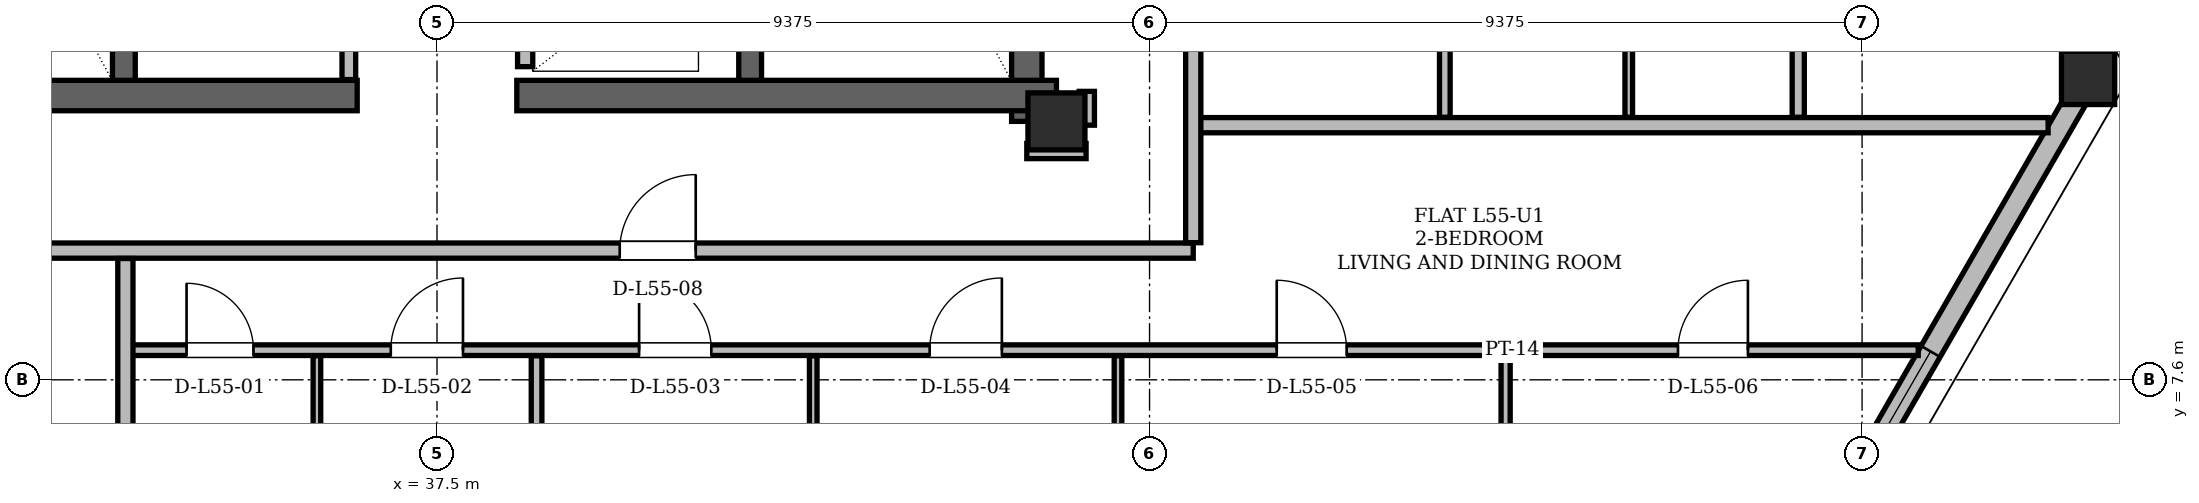
"""IFC4 building model, lengths in metres.
Left out: names, types, materials, properties, quantities, classifications, styles, units other than length and angle.
Written with IfcOpenShell. Run it as: python <this file> out.ifc"""

import sys

from ifc_helpers import new_model, si_unit, direction, frame, frame_2d, origin, origin_2d, place, context, subcontext, project, spatial, rectangle, hollow_rectangle, extrude, element, fill, save


model = new_model("IFC4")
c1 = context("Model", 3, precision=1e-05, world=origin(), true_north=direction((0.0, 1.0)))
c2 = subcontext(c1, "Body", "Model", "MODEL_VIEW")
j1 = project(units=[si_unit("LENGTHUNIT", "METRE"), si_unit("PLANEANGLEUNIT", "RADIAN")], contexts=[c1])
p1 = place(None, origin())
s1 = spatial("IfcSite", under=j1, at=p1, CompositionType="ELEMENT")
p2 = place(p1, origin())
s2 = spatial("IfcBuilding", under=s1, at=p2, CompositionType="ELEMENT")
p3 = place(p2, frame((0.0, 0.0, 209.1)))
s3 = spatial("IfcBuildingStorey", under=s2, at=p3, CompositionType="ELEMENT", Elevation=209.1)
p4 = place(p3, frame((45.65, 11.0, 0.0), z_axis=(0.0, 0.0, 1.0), x_axis=(1.0, 0.0, 0.0)))
e1 = element("IfcColumn", 1, at=p4, inside=s3, PredefinedType="COLUMN", context=c2, shape_type="SweptSolid", body=[
    extrude(hollow_rectangle(XDim=0.75, YDim=0.75, WallThickness=0.06, at=origin_2d()), origin(), (0.0, 0.0, 1.0), 3.6),
])
p5 = place(p3, frame((59.246, 11.601, 0.004), z_axis=(-0.012370810716, -0.016177214013, 0.999792608889), x_axis=(0.794357832977, -0.607450107571, 0.0)))
e2 = element("IfcColumn", 2, at=p5, inside=s3, PredefinedType="COLUMN", context=c2, shape_type="SweptSolid", body=[
    extrude(hollow_rectangle(XDim=0.7, YDim=0.7, WallThickness=0.055, at=origin_2d()), origin(), (0.0, 0.0, 1.0), 3.592),
])
p6 = place(p3, frame((45.26, 11.0, 0.0), z_axis=(0.0, 0.0, 1.0), x_axis=(0.0, 1.0, 0.0)))
e3 = element("IfcWall", 3, at=p6, inside=s3, PredefinedType="SHEAR", context=c2, shape_type="SweptSolid", body=[
    extrude(rectangle(XDim=13.3, YDim=0.4, at=frame_2d((6.65, 0.0))), origin(), (0.0, 0.0, 1.0), 3.38),
])
for number, where, z_axis, x_axis in (
    (4, (29.35, 11.34, 0.0), (0.0, 0.0, 1.0), (1.0, 0.0, 0.0)),
    (5, (38.55, 11.34, 0.0), (0.0, 0.0, 1.0), (1.0, 0.0, 0.0)),
):
    element("IfcWall", number, at=place(p3, frame(where, z_axis=z_axis, x_axis=x_axis)), inside=s3, PredefinedType="SHEAR", context=c2, shape_type="SweptSolid", body=[
        extrude(rectangle(XDim=7.1, YDim=0.4, at=frame_2d((3.55, 0.0))), origin(), (0.0, 0.0, 1.0), 3.38),
    ])
for number, where, z_axis, x_axis in (
    (6, (33.38, 11.54, 0.0), (0.0, 0.0, 1.0), (0.0, 1.0, 0.0)),
    (7, (41.62, 11.54, 0.0), (0.0, 0.0, 1.0), (0.0, 1.0, 0.0)),
):
    element("IfcWall", number, at=place(p3, frame(where, z_axis=z_axis, x_axis=x_axis)), inside=s3, PredefinedType="SHEAR", context=c2, shape_type="SweptSolid", body=[
        extrude(rectangle(XDim=7.62, YDim=0.3, at=frame_2d((3.81, 0.0))), origin(), (0.0, 0.0, 1.0), 3.38),
    ])
p7 = place(p3, frame((55.733, 5.517, 0.0), z_axis=(0.0, 0.0, 1.0), x_axis=(0.500015274395, 0.866016584929, 0.0)))
e8 = element("IfcWall", 8, at=p7, inside=s3, PredefinedType="SOLIDWALL", context=c2, shape_type="SweptSolid", body=[
    extrude(rectangle(XDim=7.025, YDim=0.29, at=frame_2d((3.512, 0.0))), origin(), (0.0, 0.0, 1.0), 2.677),
])
p8 = place(p7, frame((1.636, 0.0, 0.85)))
e9 = element("IfcOpeningElement", 9, at=p8, cuts=e8, PredefinedType="OPENING", context=c2, shape_type="SweptSolid", body=[
    extrude(rectangle(XDim=1.2, YDim=1.48, at=frame_2d((0.6, 0.74))), frame((0.0, 0.145, 0.0), z_axis=(0.0, -1.0, 0.0), x_axis=(1.0, 0.0, 0.0)), (0.0, 0.0, 1.0), 0.29),
])
p9 = place(p3, frame((59.246, 11.601, 0.0), z_axis=(0.0, 0.0, 1.0), x_axis=(-0.50000139879, 0.866024596191, 0.0)))
e10 = element("IfcWall", 10, at=p9, inside=s3, PredefinedType="SOLIDWALL", context=c2, shape_type="SweptSolid", body=[
    extrude(rectangle(XDim=36.467, YDim=0.29, at=frame_2d((18.233, 0.0))), origin(), (0.0, 0.0, 1.0), 2.677),
])
p10 = place(p9, frame((6.789, 0.0, 0.0)))
e11 = element("IfcOpeningElement", 11, at=p10, cuts=e10, PredefinedType="OPENING", context=c2, shape_type="SweptSolid", body=[
    extrude(rectangle(XDim=1.5, YDim=2.2, at=frame_2d((0.75, 1.1))), frame((0.0, 0.145, 0.0), z_axis=(0.0, -1.0, 0.0), x_axis=(1.0, 0.0, 0.0)), (0.0, 0.0, 1.0), 0.29),
])
p11 = place(p9, frame((26.932, 0.0, 0.0)))
e12 = element("IfcOpeningElement", 12, at=p11, cuts=e10, PredefinedType="OPENING", context=c2, shape_type="SweptSolid", body=[
    extrude(rectangle(XDim=1.5, YDim=2.2, at=frame_2d((0.75, 1.1))), frame((0.0, 0.145, 0.0), z_axis=(0.0, -1.0, 0.0), x_axis=(1.0, 0.0, 0.0)), (0.0, 0.0, 1.0), 0.29),
])
p12 = place(p9, frame((12.324, 0.0, 0.85)))
e13 = element("IfcOpeningElement", 13, at=p12, cuts=e10, PredefinedType="OPENING", context=c2, shape_type="SweptSolid", body=[
    extrude(rectangle(XDim=1.2, YDim=1.48, at=frame_2d((0.6, 0.74))), frame((0.0, 0.145, 0.0), z_axis=(0.0, -1.0, 0.0), x_axis=(1.0, 0.0, 0.0)), (0.0, 0.0, 1.0), 0.29),
])
p13 = place(p9, frame((2.218, 0.0, 0.85)))
e14 = element("IfcOpeningElement", 14, at=p13, cuts=e10, PredefinedType="OPENING", context=c2, shape_type="SweptSolid", body=[
    extrude(rectangle(XDim=1.2, YDim=1.48, at=frame_2d((0.6, 0.74))), frame((0.0, 0.145, 0.0), z_axis=(0.0, -1.0, 0.0), x_axis=(1.0, 0.0, 0.0)), (0.0, 0.0, 1.0), 0.29),
])
p14 = place(p9, frame((17.24, 0.0, 0.85)))
e15 = element("IfcOpeningElement", 15, at=p14, cuts=e10, PredefinedType="OPENING", context=c2, shape_type="SweptSolid", body=[
    extrude(rectangle(XDim=2.6, YDim=1.717, at=frame_2d((1.3, 0.858))), frame((0.0, 0.145, 0.0), z_axis=(0.0, -1.0, 0.0), x_axis=(1.0, 0.0, 0.0)), (0.0, 0.0, 1.0), 0.29),
])
p15 = place(p9, frame((34.098, 0.0, 0.85)))
e16 = element("IfcOpeningElement", 16, at=p15, cuts=e10, PredefinedType="OPENING", context=c2, shape_type="SweptSolid", body=[
    extrude(rectangle(XDim=1.2, YDim=1.48, at=frame_2d((0.6, 0.74))), frame((0.0, 0.145, 0.0), z_axis=(0.0, -1.0, 0.0), x_axis=(1.0, 0.0, 0.0)), (0.0, 0.0, 1.0), 0.29),
])
p16 = place(p3, frame((33.988, 43.182, 0.0), z_axis=(0.0, 0.0, 1.0), x_axis=(-0.50000139879, -0.866024596191, 0.0)))
e17 = element("IfcWall", 17, at=p16, inside=s3, PredefinedType="SOLIDWALL", context=c2, shape_type="SweptSolid", body=[
    extrude(rectangle(XDim=36.467, YDim=0.29, at=frame_2d((18.233, 0.0))), origin(), (0.0, 0.0, 1.0), 2.677),
])
p17 = place(p16, frame((3.429, 0.0, 0.0)))
e18 = element("IfcOpeningElement", 18, at=p17, cuts=e17, PredefinedType="OPENING", context=c2, shape_type="SweptSolid", body=[
    extrude(rectangle(XDim=1.5, YDim=2.2, at=frame_2d((0.75, 1.1))), frame((0.0, 0.145, 0.0), z_axis=(0.0, -1.0, 0.0), x_axis=(1.0, 0.0, 0.0)), (0.0, 0.0, 1.0), 0.29),
])
p18 = place(p16, frame((26.722, 0.0, 0.0)))
e19 = element("IfcOpeningElement", 19, at=p18, cuts=e17, PredefinedType="OPENING", context=c2, shape_type="SweptSolid", body=[
    extrude(rectangle(XDim=1.5, YDim=2.2, at=frame_2d((0.75, 1.1))), frame((0.0, 0.145, 0.0), z_axis=(0.0, -1.0, 0.0), x_axis=(1.0, 0.0, 0.0)), (0.0, 0.0, 1.0), 0.29),
])
p19 = place(p16, frame((33.056, 0.0, 0.85)))
e20 = element("IfcOpeningElement", 20, at=p19, cuts=e17, PredefinedType="OPENING", context=c2, shape_type="SweptSolid", body=[
    extrude(rectangle(XDim=1.6, YDim=1.7, at=frame_2d((0.8, 0.85))), frame((0.0, 0.145, 0.0), z_axis=(0.0, -1.0, 0.0), x_axis=(1.0, 0.0, 0.0)), (0.0, 0.0, 1.0), 0.29),
])
p20 = place(p16, frame((22.736, 0.0, 0.85)))
e21 = element("IfcOpeningElement", 21, at=p20, cuts=e17, PredefinedType="OPENING", context=c2, shape_type="SweptSolid", body=[
    extrude(rectangle(XDim=1.2, YDim=1.48, at=frame_2d((0.6, 0.74))), frame((0.0, 0.145, 0.0), z_axis=(0.0, -1.0, 0.0), x_axis=(1.0, 0.0, 0.0)), (0.0, 0.0, 1.0), 0.29),
])
p21 = place(p3, frame((36.34, 11.55, 0.0), z_axis=(0.0, 0.0, 1.0), x_axis=(0.0, 1.0, 0.0)))
e22 = element("IfcWall", 22, at=p21, inside=s3, PredefinedType="PARTITIONING", context=c2, shape_type="SweptSolid", body=[
    extrude(rectangle(XDim=5.55, YDim=0.18, at=frame_2d((2.775, 0.0))), origin(), (0.0, 0.0, 1.0), 3.38),
])
p22 = place(p21, frame((0.55, 0.0, 0.0)))
e23 = element("IfcOpeningElement", 23, at=p22, cuts=e22, PredefinedType="OPENING", context=c2, shape_type="SweptSolid", body=[
    extrude(rectangle(XDim=0.88, YDim=2.08, at=frame_2d((0.44, 1.04))), frame((0.0, 0.09, 0.0), z_axis=(0.0, -1.0, 0.0), x_axis=(1.0, 0.0, 0.0)), (0.0, 0.0, 1.0), 0.18),
])
p23 = place(p21, frame((3.25, 0.0, 0.0)))
e24 = element("IfcOpeningElement", 24, at=p23, cuts=e22, PredefinedType="OPENING", context=c2, shape_type="SweptSolid", body=[
    extrude(rectangle(XDim=0.88, YDim=2.08, at=frame_2d((0.44, 1.04))), frame((0.0, 0.09, 0.0), z_axis=(0.0, -1.0, 0.0), x_axis=(1.0, 0.0, 0.0)), (0.0, 0.0, 1.0), 0.18),
])
p24 = place(p3, frame((38.66, 11.72, 0.0), z_axis=(0.0, 0.0, 1.0), x_axis=(0.0, 1.0, 0.0)))
e25 = element("IfcWall", 25, at=p24, inside=s3, PredefinedType="PARTITIONING", context=c2, shape_type="SweptSolid", body=[
    extrude(rectangle(XDim=9.1, YDim=0.2, at=frame_2d((4.55, 0.0))), origin(), (0.0, 0.0, 1.0), 3.38),
])
p25 = place(p24, frame((5.905, 0.0, 0.0)))
e26 = element("IfcOpeningElement", 26, at=p25, cuts=e25, PredefinedType="OPENING", context=c2, shape_type="SweptSolid", body=[
    extrude(rectangle(XDim=1.05, YDim=2.15, at=frame_2d((0.525, 1.075))), frame((0.0, 0.1, 0.0), z_axis=(0.0, -1.0, 0.0), x_axis=(1.0, 0.0, 0.0)), (0.0, 0.0, 1.0), 0.2),
])
p26 = place(p24, frame((7.705, 0.0, 0.0)))
e27 = element("IfcOpeningElement", 27, at=p26, cuts=e25, PredefinedType="OPENING", context=c2, shape_type="SweptSolid", body=[
    extrude(rectangle(XDim=1.05, YDim=2.15, at=frame_2d((0.525, 1.075))), frame((0.0, 0.1, 0.0), z_axis=(0.0, -1.0, 0.0), x_axis=(1.0, 0.0, 0.0)), (0.0, 0.0, 1.0), 0.2),
])
p27 = place(p3, frame((33.35, 7.99, 0.0), z_axis=(0.0, 0.0, 1.0), x_axis=(1.0, 0.0, 0.0)))
e28 = element("IfcWall", 28, at=p27, inside=s3, PredefinedType="PARTITIONING", context=c2, shape_type="SweptSolid", body=[
    extrude(rectangle(XDim=23.639, YDim=0.14, at=frame_2d((11.819, 0.0))), origin(), (0.0, 0.0, 1.0), 2.913),
])
p28 = place(p27, frame((0.855, 0.0, 0.0)))
e29 = element("IfcOpeningElement", 29, at=p28, cuts=e28, PredefinedType="OPENING", context=c2, shape_type="SweptSolid", body=[
    extrude(rectangle(XDim=0.88, YDim=2.08, at=frame_2d((0.44, 1.04))), frame((0.0, 0.07, 0.0), z_axis=(0.0, -1.0, 0.0), x_axis=(1.0, 0.0, 0.0)), (0.0, 0.0, 1.0), 0.14),
])
p29 = place(p27, frame((3.542, 0.0, 0.0)))
e30 = element("IfcOpeningElement", 30, at=p29, cuts=e28, PredefinedType="OPENING", context=c2, shape_type="SweptSolid", body=[
    extrude(rectangle(XDim=0.95, YDim=2.1, at=frame_2d((0.475, 1.05))), frame((0.0, 0.07, 0.0), z_axis=(0.0, -1.0, 0.0), x_axis=(1.0, 0.0, 0.0)), (0.0, 0.0, 1.0), 0.14),
])
p30 = place(p27, frame((6.809, 0.0, 0.0)))
e31 = element("IfcOpeningElement", 31, at=p30, cuts=e28, PredefinedType="OPENING", context=c2, shape_type="SweptSolid", body=[
    extrude(rectangle(XDim=0.95, YDim=2.1, at=frame_2d((0.475, 1.05))), frame((0.0, 0.07, 0.0), z_axis=(0.0, -1.0, 0.0), x_axis=(1.0, 0.0, 0.0)), (0.0, 0.0, 1.0), 0.14),
])
p31 = place(p27, frame((10.632, 0.0, 0.0)))
e32 = element("IfcOpeningElement", 32, at=p31, cuts=e28, PredefinedType="OPENING", context=c2, shape_type="SweptSolid", body=[
    extrude(rectangle(XDim=0.95, YDim=2.1, at=frame_2d((0.475, 1.05))), frame((0.0, 0.07, 0.0), z_axis=(0.0, -1.0, 0.0), x_axis=(1.0, 0.0, 0.0)), (0.0, 0.0, 1.0), 0.14),
])
p32 = place(p27, frame((15.198, 0.0, 0.0)))
e33 = element("IfcOpeningElement", 33, at=p32, cuts=e28, PredefinedType="OPENING", context=c2, shape_type="SweptSolid", body=[
    extrude(rectangle(XDim=0.92, YDim=2.12, at=frame_2d((0.46, 1.06))), frame((0.0, 0.07, 0.0), z_axis=(0.0, -1.0, 0.0), x_axis=(1.0, 0.0, 0.0)), (0.0, 0.0, 1.0), 0.14),
])
p33 = place(p27, frame((20.478, 0.0, 0.0)))
e34 = element("IfcOpeningElement", 34, at=p33, cuts=e28, PredefinedType="OPENING", context=c2, shape_type="SweptSolid", body=[
    extrude(rectangle(XDim=0.92, YDim=2.12, at=frame_2d((0.46, 1.06))), frame((0.0, 0.07, 0.0), z_axis=(0.0, -1.0, 0.0), x_axis=(1.0, 0.0, 0.0)), (0.0, 0.0, 1.0), 0.14),
])
p34 = place(p3, frame((25.6, 9.3, 0.0), z_axis=(0.0, 0.0, 1.0), x_axis=(1.0, 0.0, 0.0)))
e35 = element("IfcWall", 35, at=p34, inside=s3, PredefinedType="PARTITIONING", context=c2, shape_type="SweptSolid", body=[
    extrude(rectangle(XDim=21.85, YDim=0.2, at=frame_2d((10.925, 0.0))), origin(), (0.0, 0.0, 1.0), 2.913),
])
p35 = place(p34, frame((4.018, 0.0, 0.0)))
e36 = element("IfcOpeningElement", 36, at=p35, cuts=e35, PredefinedType="OPENING", context=c2, shape_type="SweptSolid", body=[
    extrude(rectangle(XDim=1.0, YDim=2.18, at=frame_2d((0.5, 1.09))), frame((0.0, 0.1, 0.0), z_axis=(0.0, -1.0, 0.0), x_axis=(1.0, 0.0, 0.0)), (0.0, 0.0, 1.0), 0.2),
])
p36 = place(p34, frame((14.304, 0.0, 0.0)))
e37 = element("IfcOpeningElement", 37, at=p36, cuts=e35, PredefinedType="OPENING", context=c2, shape_type="SweptSolid", body=[
    extrude(rectangle(XDim=1.0, YDim=2.18, at=frame_2d((0.5, 1.09))), frame((0.0, 0.1, 0.0), z_axis=(0.0, -1.0, 0.0), x_axis=(1.0, 0.0, 0.0)), (0.0, 0.0, 1.0), 0.2),
])
p37 = place(p3, frame((45.26, 10.61, 0.0), z_axis=(0.0, 0.0, 1.0), x_axis=(1.0, 0.0, 0.0)))
e38 = element("IfcWall", 38, at=p37, inside=s3, PredefinedType="PARTITIONING", context=c2, shape_type="SweptSolid", body=[
    extrude(rectangle(XDim=0.78, YDim=0.2, at=frame_2d((0.39, 0.0))), origin(), (0.0, 0.0, 1.0), 3.38),
])
p38 = place(p3, frame((47.45, 10.95, 0.0), z_axis=(0.0, 0.0, 1.0), x_axis=(1.0, 0.0, 0.0)))
e39 = element("IfcWall", 39, at=p38, inside=s3, PredefinedType="PARTITIONING", context=c2, shape_type="SweptSolid", body=[
    extrude(rectangle(XDim=11.248, YDim=0.2, at=frame_2d((5.624, 0.0))), origin(), (0.0, 0.0, 1.0), 2.913),
])
p39 = place(p3, frame((33.4, 5.666, 0.0), z_axis=(0.0, 0.0, 1.0), x_axis=(0.0, 1.0, 0.0)))
e40 = element("IfcWall", 40, at=p39, inside=s3, PredefinedType="PARTITIONING", context=c2, shape_type="SweptSolid", body=[
    extrude(rectangle(XDim=3.53, YDim=0.2, at=frame_2d((1.765, 0.0))), origin(), (0.0, 0.0, 1.0), 3.38),
])
p40 = place(p3, frame((35.92, 5.666, 0.0), z_axis=(0.0, 0.0, 1.0), x_axis=(0.0, 1.0, 0.0)))
e41 = element("IfcWall", 41, at=p40, inside=s3, PredefinedType="PARTITIONING", context=c2, shape_type="SweptSolid", body=[
    extrude(rectangle(XDim=2.25, YDim=0.1, at=frame_2d((1.125, 0.0))), origin(), (0.0, 0.0, 1.0), 3.38),
])
p41 = place(p3, frame((38.81, 5.666, 0.0), z_axis=(0.0, 0.0, 1.0), x_axis=(0.0, 1.0, 0.0)))
e42 = element("IfcWall", 42, at=p41, inside=s3, PredefinedType="PARTITIONING", context=c2, shape_type="SweptSolid", body=[
    extrude(rectangle(XDim=2.25, YDim=0.14, at=frame_2d((1.125, 0.0))), origin(), (0.0, 0.0, 1.0), 3.38),
])
p42 = place(p3, frame((42.45, 5.666, 0.0), z_axis=(0.0, 0.0, 1.0), x_axis=(0.0, 1.0, 0.0)))
e43 = element("IfcWall", 43, at=p42, inside=s3, PredefinedType="PARTITIONING", context=c2, shape_type="SweptSolid", body=[
    extrude(rectangle(XDim=2.25, YDim=0.1, at=frame_2d((1.125, 0.0))), origin(), (0.0, 0.0, 1.0), 3.38),
])
p43 = place(p3, frame((46.05, 10.95, 0.0), z_axis=(0.0, 0.0, 1.0), x_axis=(0.0, 1.0, 0.0)))
e44 = element("IfcWall", 44, at=p43, inside=s3, PredefinedType="PARTITIONING", context=c2, shape_type="SweptSolid", body=[
    extrude(rectangle(XDim=0.445, YDim=0.2, at=frame_2d((0.223, 0.0))), origin(), (0.0, 0.0, 1.0), 2.913),
])
p44 = place(p3, frame((46.46, 5.666, 0.0), z_axis=(0.0, 0.0, 1.0), x_axis=(0.0, 1.0, 0.0)))
e45 = element("IfcWall", 45, at=p44, inside=s3, PredefinedType="PARTITIONING", context=c2, shape_type="SweptSolid", body=[
    extrude(rectangle(XDim=2.25, YDim=0.1, at=frame_2d((1.125, 0.0))), origin(), (0.0, 0.0, 1.0), 3.38),
])
p45 = place(p3, frame((47.45, 9.404, 0.0), z_axis=(0.0, 0.0, 1.0), x_axis=(0.0, 1.0, 0.0)))
e46 = element("IfcWall", 46, at=p45, inside=s3, PredefinedType="PARTITIONING", context=c2, shape_type="SweptSolid", body=[
    extrude(rectangle(XDim=16.462, YDim=0.2, at=frame_2d((8.231, 0.0))), origin(), (0.0, 0.0, 1.0), 2.913),
])
p46 = place(p45, frame((9.496, 0.0, 0.0)))
e47 = element("IfcOpeningElement", 47, at=p46, cuts=e46, PredefinedType="OPENING", context=c2, shape_type="SweptSolid", body=[
    extrude(rectangle(XDim=1.0, YDim=2.18, at=frame_2d((0.5, 1.09))), frame((0.0, 0.1, 0.0), z_axis=(0.0, -1.0, 0.0), x_axis=(1.0, 0.0, 0.0)), (0.0, 0.0, 1.0), 0.2),
])
p47 = place(p3, frame((50.76, 11.054, 0.0), z_axis=(0.0, 0.0, 1.0), x_axis=(0.0, 1.0, 0.0)))
e48 = element("IfcWall", 48, at=p47, inside=s3, PredefinedType="PARTITIONING", context=c2, shape_type="SweptSolid", body=[
    extrude(rectangle(XDim=3.542, YDim=0.14, at=frame_2d((1.771, 0.0))), origin(), (0.0, 0.0, 1.0), 2.913),
])
p48 = place(p3, frame((51.56, 5.666, 0.0), z_axis=(0.0, 0.0, 1.0), x_axis=(0.0, 1.0, 0.0)))
e49 = element("IfcWall", 49, at=p48, inside=s3, PredefinedType="PARTITIONING", context=c2, shape_type="SweptSolid", body=[
    extrude(rectangle(XDim=2.25, YDim=0.12, at=frame_2d((1.125, 0.0))), origin(), (0.0, 0.0, 1.0), 3.38),
])
p49 = place(p3, frame((53.18, 11.054, 0.0), z_axis=(0.0, 0.0, 1.0), x_axis=(0.0, 1.0, 0.0)))
e50 = element("IfcWall", 50, at=p49, inside=s3, PredefinedType="PARTITIONING", context=c2, shape_type="SweptSolid", body=[
    extrude(rectangle(XDim=3.542, YDim=0.1, at=frame_2d((1.771, 0.0))), origin(), (0.0, 0.0, 1.0), 3.38),
])
p50 = place(p3, frame((55.41, 11.054, 0.0), z_axis=(0.0, 0.0, 1.0), x_axis=(0.0, 1.0, 0.0)))
e51 = element("IfcWall", 51, at=p50, inside=s3, PredefinedType="PARTITIONING", context=c2, shape_type="SweptSolid", body=[
    extrude(rectangle(XDim=3.542, YDim=0.16, at=frame_2d((1.771, 0.0))), origin(), (0.0, 0.0, 1.0), 2.913),
])
p51 = place(p8, origin())
e52 = element("IfcWindow", 52, at=p51, inside=s3, PartitioningType="SINGLE_PANEL", PredefinedType="WINDOW", context=c2, shape_type="SweptSolid", body=[
    extrude(rectangle(XDim=1.2, YDim=1.48, at=frame_2d((0.6, 0.74))), frame((0.0, 0.03, 0.0), z_axis=(0.0, -1.0, 0.0), x_axis=(1.0, 0.0, 0.0)), (0.0, 0.0, 1.0), 0.06),
])
fill(e9, e52)
p52 = place(p28, origin())
e53 = element("IfcDoor", 53, at=p52, inside=s3, OperationType="SINGLE_SWING_LEFT", PredefinedType="DOOR", context=c2, shape_type="SweptSolid", body=[
    extrude(rectangle(XDim=0.88, YDim=2.08, at=frame_2d((0.44, 1.04))), frame((0.0, 0.025, 0.0), z_axis=(0.0, -1.0, 0.0), x_axis=(1.0, 0.0, 0.0)), (0.0, 0.0, 1.0), 0.05),
])
fill(e29, e53)
p53 = place(p29, origin())
e54 = element("IfcDoor", 54, at=p53, inside=s3, OperationType="SINGLE_SWING_RIGHT", PredefinedType="DOOR", context=c2, shape_type="SweptSolid", body=[
    extrude(rectangle(XDim=0.95, YDim=2.1, at=frame_2d((0.475, 1.05))), frame((0.0, 0.025, 0.0), z_axis=(0.0, -1.0, 0.0), x_axis=(1.0, 0.0, 0.0)), (0.0, 0.0, 1.0), 0.05),
])
fill(e30, e54)
p54 = place(p30, origin())
e55 = element("IfcDoor", 55, at=p54, inside=s3, OperationType="SINGLE_SWING_LEFT", PredefinedType="DOOR", context=c2, shape_type="SweptSolid", body=[
    extrude(rectangle(XDim=0.95, YDim=2.1, at=frame_2d((0.475, 1.05))), frame((0.0, 0.025, 0.0), z_axis=(0.0, -1.0, 0.0), x_axis=(1.0, 0.0, 0.0)), (0.0, 0.0, 1.0), 0.05),
])
fill(e31, e55)
p55 = place(p31, origin())
e56 = element("IfcDoor", 56, at=p55, inside=s3, OperationType="SINGLE_SWING_RIGHT", PredefinedType="DOOR", context=c2, shape_type="SweptSolid", body=[
    extrude(rectangle(XDim=0.95, YDim=2.1, at=frame_2d((0.475, 1.05))), frame((0.0, 0.025, 0.0), z_axis=(0.0, -1.0, 0.0), x_axis=(1.0, 0.0, 0.0)), (0.0, 0.0, 1.0), 0.05),
])
fill(e32, e56)
p56 = place(p32, origin())
e57 = element("IfcDoor", 57, at=p56, inside=s3, OperationType="SINGLE_SWING_LEFT", PredefinedType="DOOR", context=c2, shape_type="SweptSolid", body=[
    extrude(rectangle(XDim=0.92, YDim=2.12, at=frame_2d((0.46, 1.06))), frame((0.0, 0.025, 0.0), z_axis=(0.0, -1.0, 0.0), x_axis=(1.0, 0.0, 0.0)), (0.0, 0.0, 1.0), 0.05),
])
fill(e33, e57)
p57 = place(p33, origin())
e58 = element("IfcDoor", 58, at=p57, inside=s3, OperationType="SINGLE_SWING_RIGHT", PredefinedType="DOOR", context=c2, shape_type="SweptSolid", body=[
    extrude(rectangle(XDim=0.92, YDim=2.12, at=frame_2d((0.46, 1.06))), frame((0.0, 0.025, 0.0), z_axis=(0.0, -1.0, 0.0), x_axis=(1.0, 0.0, 0.0)), (0.0, 0.0, 1.0), 0.05),
])
fill(e34, e58)
p58 = place(p36, origin())
e59 = element("IfcDoor", 59, at=p58, inside=s3, OperationType="SINGLE_SWING_RIGHT", PredefinedType="DOOR", context=c2, shape_type="SweptSolid", body=[
    extrude(rectangle(XDim=1.0, YDim=2.18, at=frame_2d((0.5, 1.09))), frame((0.0, 0.025, 0.0), z_axis=(0.0, -1.0, 0.0), x_axis=(1.0, 0.0, 0.0)), (0.0, 0.0, 1.0), 0.05),
])
fill(e37, e59)
save(model, sys.argv[1])
